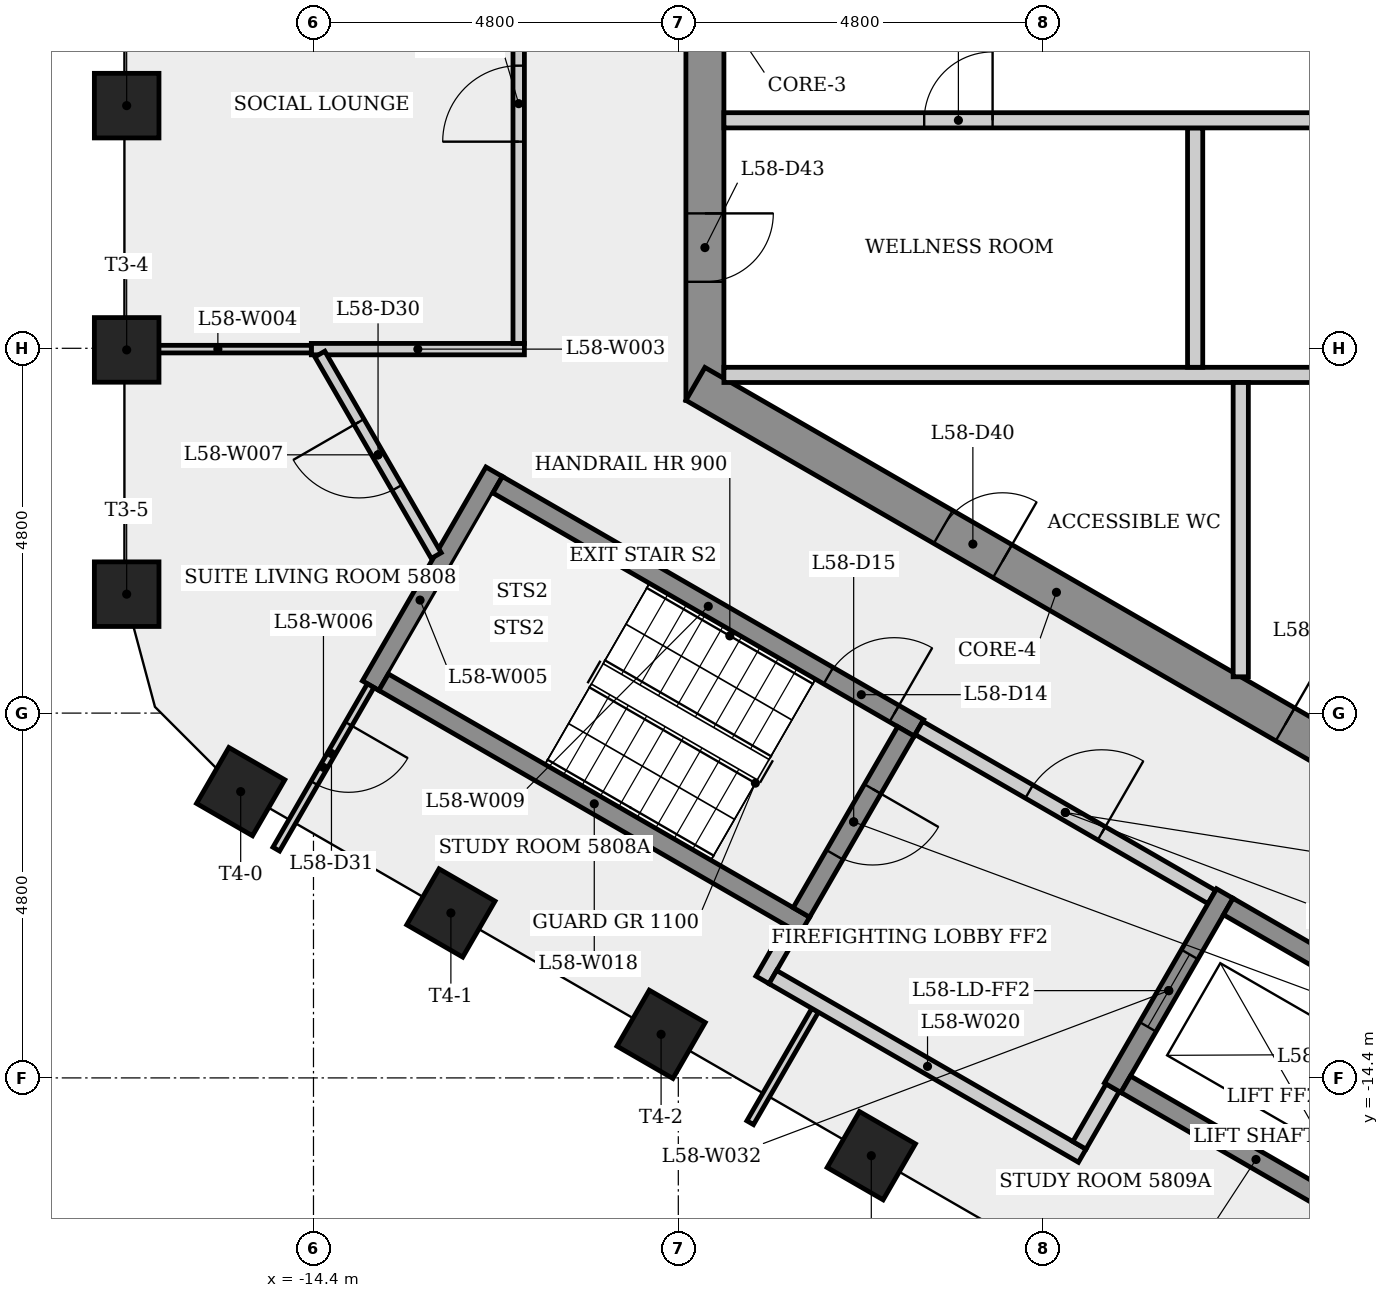
"""IFC4 building model, lengths in metres.
Left out: names, types, materials, properties, quantities, classifications, styles, units other than length and angle.
Written with IfcOpenShell. Run it as: python <this file> out.ifc"""

import sys

from ifc_helpers import new_model, si_unit, direction, frame, frame_2d, origin, origin_2d, place, context, subcontext, project, spatial, rectangle, extrude, element, fill, save


model = new_model("IFC4")
c1 = context("Model", 3, precision=1e-05, world=origin(), true_north=direction((0.0, 1.0)))
c2 = subcontext(c1, "Body", "Model", "MODEL_VIEW")
j1 = project(units=[si_unit("LENGTHUNIT", "METRE"), si_unit("PLANEANGLEUNIT", "RADIAN")], contexts=[c1])
p1 = place(None, origin())
s1 = spatial("IfcSite", under=j1, at=p1, CompositionType="ELEMENT")
p2 = place(p1, origin())
s2 = spatial("IfcBuilding", under=s1, at=p2, CompositionType="ELEMENT")
p3 = place(p2, frame((0.0, 0.0, 218.9)))
s3 = spatial("IfcBuildingStorey", under=s2, at=p3, CompositionType="ELEMENT", Elevation=218.9)
p4 = place(p3, frame((-9.25, 5.485, 0.0), z_axis=(0.0, 0.0, 1.0), x_axis=(0.0, -1.0, 0.0)))
e1 = element("IfcWall", 1, at=p4, inside=s3, PredefinedType="SHEAR", context=c2, shape_type="SweptSolid", body=[
    extrude(rectangle(XDim=10.97, YDim=0.5, at=frame_2d((5.485, 0.0))), origin(), (0.0, 0.0, 1.0), 3.4),
])
p5 = place(p4, frame((8.51, 0.0, 0.0)))
e2 = element("IfcOpeningElement", 2, at=p5, cuts=e1, PredefinedType="OPENING", context=c2, shape_type="SweptSolid", body=[
    extrude(rectangle(XDim=0.9, YDim=2.1, at=frame_2d((0.45, 1.05))), frame((0.0, 0.26, 0.0), z_axis=(0.0, -1.0, 0.0), x_axis=(1.0, 0.0, 0.0)), (0.0, 0.0, 1.0), 0.52),
])
p6 = place(p4, frame((4.685, 0.0, 0.0)))
e3 = element("IfcOpeningElement", 3, at=p6, cuts=e1, PredefinedType="OPENING", context=c2, shape_type="SweptSolid", body=[
    extrude(rectangle(XDim=1.6, YDim=2.1, at=frame_2d((0.8, 1.05))), frame((0.0, 0.26, 0.0), z_axis=(0.0, -1.0, 0.0), x_axis=(1.0, 0.0, 0.0)), (0.0, 0.0, 1.0), 0.52),
])
p7 = place(p3, frame((-9.375, -5.268, 0.0), z_axis=(0.0, 0.0, 1.0), x_axis=(0.866023993627, -0.500002442456, 0.0)))
e4 = element("IfcWall", 4, at=p7, inside=s3, PredefinedType="SHEAR", context=c2, shape_type="SweptSolid", body=[
    extrude(rectangle(XDim=10.97, YDim=0.5, at=frame_2d((5.485, 0.0))), origin(), (0.0, 0.0, 1.0), 3.4),
])
p8 = place(p7, frame((3.765, 0.0, 0.0)))
e5 = element("IfcOpeningElement", 5, at=p8, cuts=e4, PredefinedType="OPENING", context=c2, shape_type="SweptSolid", body=[
    extrude(rectangle(XDim=0.9, YDim=2.1, at=frame_2d((0.45, 1.05))), frame((0.0, 0.26, 0.0), z_axis=(0.0, -1.0, 0.0), x_axis=(1.0, 0.0, 0.0)), (0.0, 0.0, 1.0), 0.52),
])
p9 = place(p7, frame((8.96, 0.0, 0.0)))
e6 = element("IfcOpeningElement", 6, at=p9, cuts=e4, PredefinedType="OPENING", context=c2, shape_type="SweptSolid", body=[
    extrude(rectangle(XDim=0.9, YDim=2.1, at=frame_2d((0.45, 1.05))), frame((0.0, 0.26, 0.0), z_axis=(0.0, -1.0, 0.0), x_axis=(1.0, 0.0, 0.0)), (0.0, 0.0, 1.0), 0.52),
])
for number, where, z_axis, x_axis in (
    (7, (-16.858, -1.607, 0.0), (0.0, 0.0, 1.0), (-1.0, 0.0, 0.0)),
    (8, (-16.858, -4.821, 0.0), (0.0, 0.0, 1.0), (-1.0, 0.0, 0.0)),
    (9, (-16.858, -8.035, 0.0), (0.0, 0.0, 1.0), (-1.0, 0.0, 0.0)),
    (10, (-15.358, -10.633, 0.0), (0.0, 0.0, 1.0), (-0.5, -0.866, 0.0)),
    (11, (-12.592, -12.23, 0.0), (0.0, 0.0, 1.0), (-0.5, -0.866, 0.0)),
    (12, (-9.827, -13.827, 0.0), (0.0, 0.0, 1.0), (-0.5, -0.866, 0.0)),
    (13, (-7.061, -15.423, 0.0), (0.0, 0.0, 1.0), (-0.5, -0.866, 0.0)),
):
    element("IfcColumn", number, at=place(p3, frame(where, z_axis=z_axis, x_axis=x_axis)), inside=s3, PredefinedType="COLUMN", context=c2, shape_type="SweptSolid", body=[
        extrude(rectangle(XDim=0.85, YDim=0.85, at=origin_2d()), origin(), (0.0, 0.0, 1.0), 3.4),
    ])
p10 = place(p3, frame((-14.428, -4.811, 0.0), z_axis=(0.0, 0.0, 1.0), x_axis=(1.0, 0.0, 0.0)))
e14 = element("IfcWall", 14, at=p10, inside=s3, PredefinedType="PARTITIONING", context=c2, shape_type="SweptSolid", body=[
    extrude(rectangle(XDim=2.803, YDim=0.15, at=frame_2d((1.402, 0.0))), origin(), (0.0, 0.0, 1.0), 3.05),
])
p11 = place(p3, frame((-14.428, -4.811, 0.0), z_axis=(0.0, 0.0, 1.0), x_axis=(-1.0, 0.0, 0.0)))
e15 = element("IfcWall", 15, at=p11, inside=s3, PredefinedType="PARTITIONING", context=c2, shape_type="SweptSolid", body=[
    extrude(rectangle(XDim=2.459, YDim=0.1, at=frame_2d((1.229, 0.0))), origin(), (0.0, 0.0, 1.0), 3.05),
])
p12 = place(p3, frame((-13.648, -9.239, 0.0), z_axis=(0.0, 0.0, 1.0), x_axis=(0.500017246033, 0.866015446554, 0.0)))
e16 = element("IfcWall", 16, at=p12, inside=s3, PredefinedType="SHEAR", context=c2, shape_type="SweptSolid", body=[
    extrude(rectangle(XDim=3.25, YDim=0.25, at=frame_2d((1.625, 0.0))), origin(), (0.0, 0.0, 1.0), 3.05),
])
p13 = place(p3, frame((-13.648, -9.239, 0.0), z_axis=(0.0, 0.0, 1.0), x_axis=(-0.500040114371, -0.866002242503, 0.0)))
e17 = element("IfcWall", 17, at=p13, inside=s3, PredefinedType="PARTITIONING", context=c2, shape_type="SweptSolid", body=[
    extrude(rectangle(XDim=2.484, YDim=0.1, at=frame_2d((1.242, 0.0))), origin(), (0.0, 0.0, 1.0), 3.05),
])
p14 = place(p13, frame((0.581, 0.0, 0.0)))
e18 = element("IfcOpeningElement", 18, at=p14, cuts=e17, PredefinedType="OPENING", context=c2, shape_type="SweptSolid", body=[
    extrude(rectangle(XDim=0.9, YDim=2.1, at=frame_2d((0.45, 1.05))), frame((0.0, 0.06, 0.0), z_axis=(0.0, -1.0, 0.0), x_axis=(1.0, 0.0, 0.0)), (0.0, 0.0, 1.0), 0.12),
])
p15 = place(p3, frame((-12.785, -7.528, 0.0), z_axis=(0.0, 0.0, 1.0), x_axis=(-0.499989318644, 0.86603157058, 0.0)))
e19 = element("IfcWall", 19, at=p15, inside=s3, PredefinedType="PARTITIONING", context=c2, shape_type="SweptSolid", body=[
    extrude(rectangle(XDim=3.062, YDim=0.15, at=frame_2d((1.531, 0.0))), origin(), (0.0, 0.0, 1.0), 3.05),
])
p16 = place(p15, frame((1.031, 0.0, 0.0)))
e20 = element("IfcOpeningElement", 20, at=p16, cuts=e19, PredefinedType="OPENING", context=c2, shape_type="SweptSolid", body=[
    extrude(rectangle(XDim=1.0, YDim=2.1, at=frame_2d((0.5, 1.05))), frame((0.0, 0.085, 0.0), z_axis=(0.0, -1.0, 0.0), x_axis=(1.0, 0.0, 0.0)), (0.0, 0.0, 1.0), 0.17),
])
p17 = place(p3, frame((-11.977, -6.595, 0.0), z_axis=(0.0, 0.0, 1.0), x_axis=(0.866025499775, -0.499999833739, 0.0)))
e21 = element("IfcWall", 21, at=p17, inside=s3, PredefinedType="SHEAR", context=c2, shape_type="SweptSolid", body=[
    extrude(rectangle(XDim=6.4, YDim=0.25, at=frame_2d((3.2, 0.0))), origin(), (0.0, 0.0, 1.0), 3.05),
])
p18 = place(p17, frame((5.025, 0.0, 0.0)))
e22 = element("IfcOpeningElement", 22, at=p18, cuts=e21, PredefinedType="OPENING", context=c2, shape_type="SweptSolid", body=[
    extrude(rectangle(XDim=1.0, YDim=2.1, at=frame_2d((0.5, 1.05))), frame((0.0, 0.135, 0.0), z_axis=(0.0, -1.0, 0.0), x_axis=(1.0, 0.0, 0.0)), (0.0, 0.0, 1.0), 0.27),
])
p19 = place(p3, frame((-11.7, -4.736, 0.0), z_axis=(0.0, 0.0, 1.0), x_axis=(0.0, 1.0, 0.0)))
e23 = element("IfcWall", 23, at=p19, inside=s3, PredefinedType="PARTITIONING", context=c2, shape_type="SweptSolid", body=[
    extrude(rectangle(XDim=9.622, YDim=0.15, at=frame_2d((4.811, 0.0))), origin(), (0.0, 0.0, 1.0), 3.05),
])
p20 = place(p19, frame((7.443, 0.0, 0.0)))
e24 = element("IfcOpeningElement", 24, at=p20, cuts=e23, PredefinedType="OPENING", context=c2, shape_type="SweptSolid", body=[
    extrude(rectangle(XDim=1.0, YDim=2.1, at=frame_2d((0.5, 1.05))), frame((0.0, 0.085, 0.0), z_axis=(0.0, -1.0, 0.0), x_axis=(1.0, 0.0, 0.0)), (0.0, 0.0, 1.0), 0.17),
])
p21 = place(p19, frame((2.655, 0.0, 0.0)))
e25 = element("IfcOpeningElement", 25, at=p21, cuts=e23, PredefinedType="OPENING", context=c2, shape_type="SweptSolid", body=[
    extrude(rectangle(XDim=1.0, YDim=2.1, at=frame_2d((0.5, 1.05))), frame((0.0, 0.085, 0.0), z_axis=(0.0, -1.0, 0.0), x_axis=(1.0, 0.0, 0.0)), (0.0, 0.0, 1.0), 0.17),
])
p22 = place(p3, frame((-9.0, -5.15, 0.0), z_axis=(0.0, 0.0, 1.0), x_axis=(1.0, 0.0, 0.0)))
e26 = element("IfcWall", 26, at=p22, inside=s3, PredefinedType="PARTITIONING", context=c2, shape_type="SweptSolid", body=[
    extrude(rectangle(XDim=11.325, YDim=0.2, at=frame_2d((5.663, 0.0))), origin(), (0.0, 0.0, 1.0), 3.05),
])
p23 = place(p3, frame((-8.493, -13.11, 0.0), z_axis=(0.0, 0.0, 1.0), x_axis=(0.500067724834, 0.865986299303, 0.0)))
e27 = element("IfcWall", 27, at=p23, inside=s3, PredefinedType="PARTITIONING", context=c2, shape_type="SweptSolid", body=[
    extrude(rectangle(XDim=0.775, YDim=0.2, at=frame_2d((0.388, 0.0))), origin(), (0.0, 0.0, 1.0), 3.05),
])
p24 = place(p3, frame((-7.935, -12.393, 0.0), z_axis=(0.0, 0.0, 1.0), x_axis=(-0.866025499775, 0.499999833739, 0.0)))
e28 = element("IfcWall", 28, at=p24, inside=s3, PredefinedType="SHEAR", context=c2, shape_type="SweptSolid", body=[
    extrude(rectangle(XDim=6.4, YDim=0.25, at=frame_2d((3.2, 0.0))), origin(), (0.0, 0.0, 1.0), 3.05),
])
p25 = place(p3, frame((-7.8, -13.51, 0.0), z_axis=(0.0, 0.0, 1.0), x_axis=(-0.500027584368, -0.866009477356, 0.0)))
e29 = element("IfcWall", 29, at=p25, inside=s3, PredefinedType="PARTITIONING", context=c2, shape_type="SweptSolid", body=[
    extrude(rectangle(XDim=1.708, YDim=0.1, at=frame_2d((0.854, 0.0))), origin(), (0.0, 0.0, 1.0), 3.05),
])
p26 = place(p3, frame((-8.356, -13.073, 0.0), z_axis=(0.0, 0.0, 1.0), x_axis=(0.866038532462, -0.499977259774, 0.0)))
e30 = element("IfcWall", 30, at=p26, inside=s3, PredefinedType="PARTITIONING", context=c2, shape_type="SweptSolid", body=[
    extrude(rectangle(XDim=4.7, YDim=0.2, at=frame_2d((2.35, 0.0))), origin(), (0.0, 0.0, 1.0), 3.05),
])
p27 = place(p3, frame((-6.605, -9.841, 0.0), z_axis=(0.0, 0.0, 1.0), x_axis=(-0.499996545922, -0.866027397988, 0.0)))
e31 = element("IfcWall", 31, at=p27, inside=s3, PredefinedType="SHEAR", context=c2, shape_type="SweptSolid", body=[
    extrude(rectangle(XDim=2.75, YDim=0.25, at=frame_2d((1.375, 0.0))), origin(), (0.0, 0.0, 1.0), 3.05),
])
p28 = place(p27, frame((0.875, 0.0, 0.0)))
e32 = element("IfcOpeningElement", 32, at=p28, cuts=e31, PredefinedType="OPENING", context=c2, shape_type="SweptSolid", body=[
    extrude(rectangle(XDim=1.0, YDim=2.1, at=frame_2d((0.5, 1.05))), frame((0.0, 0.135, 0.0), z_axis=(0.0, -1.0, 0.0), x_axis=(1.0, 0.0, 0.0)), (0.0, 0.0, 1.0), 0.27),
])
p29 = place(p3, frame((-6.435, -9.795, 0.0), z_axis=(0.0, 0.0, 1.0), x_axis=(0.866012907634, -0.500021643343, 0.0)))
e33 = element("IfcWall", 33, at=p29, inside=s3, PredefinedType="PARTITIONING", context=c2, shape_type="SweptSolid", body=[
    extrude(rectangle(XDim=4.45, YDim=0.2, at=frame_2d((2.225, 0.0))), origin(), (0.0, 0.0, 1.0), 3.05),
])
p30 = place(p29, frame((1.675, 0.0, 0.0)))
e34 = element("IfcOpeningElement", 34, at=p30, cuts=e33, PredefinedType="OPENING", context=c2, shape_type="SweptSolid", body=[
    extrude(rectangle(XDim=1.1, YDim=2.1, at=frame_2d((0.55, 1.05))), frame((0.0, 0.11, 0.0), z_axis=(0.0, -1.0, 0.0), x_axis=(1.0, 0.0, 0.0)), (0.0, 0.0, 1.0), 0.22),
])
p31 = place(p3, frame((-3.885, -14.529, 0.0), z_axis=(0.0, 0.0, 1.0), x_axis=(-0.499859285417, -0.866106630146, 0.0)))
e35 = element("IfcWall", 35, at=p31, inside=s3, PredefinedType="PARTITIONING", context=c2, shape_type="SweptSolid", body=[
    extrude(rectangle(XDim=0.875, YDim=0.2, at=frame_2d((0.438, 0.0))), origin(), (0.0, 0.0, 1.0), 3.05),
])
p32 = place(p3, frame((-2.8, -1.9, 0.0), z_axis=(0.0, 0.0, 1.0), x_axis=(0.0, -1.0, 0.0)))
e36 = element("IfcWall", 36, at=p32, inside=s3, PredefinedType="PARTITIONING", context=c2, shape_type="SweptSolid", body=[
    extrude(rectangle(XDim=3.15, YDim=0.2, at=frame_2d((1.575, 0.0))), origin(), (0.0, 0.0, 1.0), 3.05),
])
p33 = place(p3, frame((-9.0, -1.8, 0.0), z_axis=(0.0, 0.0, 1.0), x_axis=(1.0, 0.0, 0.0)))
e37 = element("IfcWall", 37, at=p33, inside=s3, PredefinedType="PARTITIONING", context=c2, shape_type="SweptSolid", body=[
    extrude(rectangle(XDim=11.325, YDim=0.2, at=frame_2d((5.663, 0.0))), origin(), (0.0, 0.0, 1.0), 3.05),
])
p34 = place(p33, frame((2.635, 0.0, 0.0)))
e38 = element("IfcOpeningElement", 38, at=p34, cuts=e37, PredefinedType="OPENING", context=c2, shape_type="SweptSolid", body=[
    extrude(rectangle(XDim=0.9, YDim=2.1, at=frame_2d((0.45, 1.05))), frame((0.0, 0.11, 0.0), z_axis=(0.0, -1.0, 0.0), x_axis=(1.0, 0.0, 0.0)), (0.0, 0.0, 1.0), 0.22),
])
p35 = place(p33, frame((8.488, 0.0, 0.0)))
e39 = element("IfcOpeningElement", 39, at=p35, cuts=e37, PredefinedType="OPENING", context=c2, shape_type="SweptSolid", body=[
    extrude(rectangle(XDim=0.9, YDim=2.1, at=frame_2d((0.45, 1.05))), frame((0.0, 0.11, 0.0), z_axis=(0.0, -1.0, 0.0), x_axis=(1.0, 0.0, 0.0)), (0.0, 0.0, 1.0), 0.22),
])
p36 = place(p3, frame((-2.41, -11.974, 0.0), z_axis=(0.0, 0.0, 1.0), x_axis=(-0.500001826776, -0.866024349092, 0.0)))
e40 = element("IfcWall", 40, at=p36, inside=s3, PredefinedType="SHEAR", context=c2, shape_type="SweptSolid", body=[
    extrude(rectangle(XDim=2.95, YDim=0.25, at=frame_2d((1.475, 0.0))), origin(), (0.0, 0.0, 1.0), 3.05),
])
p37 = place(p36, frame((0.925, 0.0, 0.0)))
e41 = element("IfcOpeningElement", 41, at=p37, cuts=e40, PredefinedType="OPENING", context=c2, shape_type="SweptSolid", body=[
    extrude(rectangle(XDim=1.1, YDim=2.1, at=frame_2d((0.55, 1.05))), frame((0.0, 0.135, 0.0), z_axis=(0.0, -1.0, 0.0), x_axis=(1.0, 0.0, 0.0)), (0.0, 0.0, 1.0), 0.27),
])
p38 = place(p3, frame((-2.364, -12.145, 0.0), z_axis=(0.0, 0.0, 1.0), x_axis=(0.866040211805, -0.499974350878, 0.0)))
e42 = element("IfcWall", 42, at=p38, inside=s3, PredefinedType="SHEAR", context=c2, shape_type="SweptSolid", body=[
    extrude(rectangle(XDim=3.3, YDim=0.25, at=frame_2d((1.65, 0.0))), origin(), (0.0, 0.0, 1.0), 3.05),
])
p39 = place(p3, frame((-2.419, -18.59, 0.0), z_axis=(0.0, 0.0, 1.0), x_axis=(0.500016013541, 0.866016158165, 0.0)))
e43 = element("IfcWall", 43, at=p39, inside=s3, PredefinedType="PARTITIONING", context=c2, shape_type="SweptSolid", body=[
    extrude(rectangle(XDim=2.784, YDim=0.1, at=frame_2d((1.392, 0.0))), origin(), (0.0, 0.0, 1.0), 3.05),
])
p40 = place(p39, frame((1.152, 0.0, 0.0)))
e44 = element("IfcOpeningElement", 44, at=p40, cuts=e43, PredefinedType="OPENING", context=c2, shape_type="SweptSolid", body=[
    extrude(rectangle(XDim=0.9, YDim=2.1, at=frame_2d((0.45, 1.05))), frame((0.0, 0.06, 0.0), z_axis=(0.0, -1.0, 0.0), x_axis=(1.0, 0.0, 0.0)), (0.0, 0.0, 1.0), 0.12),
])
p41 = place(p3, frame((-2.2, -5.25, 0.0), z_axis=(0.0, 0.0, 1.0), x_axis=(0.0, -1.0, 0.0)))
e45 = element("IfcWall", 45, at=p41, inside=s3, PredefinedType="PARTITIONING", context=c2, shape_type="SweptSolid", body=[
    extrude(rectangle(XDim=3.872, YDim=0.2, at=frame_2d((1.936, 0.0))), origin(), (0.0, 0.0, 1.0), 3.05),
])
p42 = place(p3, frame((-0.856, -16.133, 0.0), z_axis=(0.0, 0.0, 1.0), x_axis=(-0.866021716278, 0.500006386895, 0.0)))
e46 = element("IfcWall", 46, at=p42, inside=s3, PredefinedType="SHEAR", context=c2, shape_type="SweptSolid", body=[
    extrude(rectangle(XDim=3.3, YDim=0.25, at=frame_2d((1.65, 0.0))), origin(), (0.0, 0.0, 1.0), 3.05),
])
p43 = place(p34, origin())
e47 = element("IfcDoor", 47, at=p43, inside=s3, OperationType="SINGLE_SWING_RIGHT", PredefinedType="DOOR", context=c2, shape_type="SweptSolid", body=[
    extrude(rectangle(XDim=0.9, YDim=2.1, at=frame_2d((0.45, 1.05))), frame((0.0, 0.025, 0.0), z_axis=(0.0, -1.0, 0.0), x_axis=(1.0, 0.0, 0.0)), (0.0, 0.0, 1.0), 0.05),
])
fill(e38, e47)
p44 = place(p18, origin())
e48 = element("IfcDoor", 48, at=p44, inside=s3, OperationType="SINGLE_SWING_RIGHT", PredefinedType="DOOR", context=c2, shape_type="SweptSolid", body=[
    extrude(rectangle(XDim=1.0, YDim=2.1, at=frame_2d((0.5, 1.05))), frame((0.0, 0.025, 0.0), z_axis=(0.0, -1.0, 0.0), x_axis=(1.0, 0.0, 0.0)), (0.0, 0.0, 1.0), 0.05),
])
fill(e22, e48)
p45 = place(p28, origin())
e49 = element("IfcDoor", 49, at=p45, inside=s3, OperationType="SINGLE_SWING_LEFT", PredefinedType="DOOR", context=c2, shape_type="SweptSolid", body=[
    extrude(rectangle(XDim=1.0, YDim=2.1, at=frame_2d((0.5, 1.05))), frame((0.0, 0.025, 0.0), z_axis=(0.0, -1.0, 0.0), x_axis=(1.0, 0.0, 0.0)), (0.0, 0.0, 1.0), 0.05),
])
fill(e32, e49)
p46 = place(p30, origin())
e50 = element("IfcDoor", 50, at=p46, inside=s3, OperationType="SINGLE_SWING_RIGHT", PredefinedType="DOOR", context=c2, shape_type="SweptSolid", body=[
    extrude(rectangle(XDim=1.1, YDim=2.1, at=frame_2d((0.55, 1.05))), frame((0.0, 0.025, 0.0), z_axis=(0.0, -1.0, 0.0), x_axis=(1.0, 0.0, 0.0)), (0.0, 0.0, 1.0), 0.05),
])
fill(e34, e50)
p47 = place(p37, origin())
e51 = element("IfcDoor", 51, at=p47, inside=s3, OperationType="SLIDING_TO_LEFT", PredefinedType="DOOR", context=c2, shape_type="SweptSolid", body=[
    extrude(rectangle(XDim=1.1, YDim=2.1, at=frame_2d((0.55, 1.05))), frame((0.0, 0.025, 0.0), z_axis=(0.0, -1.0, 0.0), x_axis=(1.0, 0.0, 0.0)), (0.0, 0.0, 1.0), 0.05),
])
fill(e41, e51)
p48 = place(p21, origin())
e52 = element("IfcDoor", 52, at=p48, inside=s3, OperationType="SINGLE_SWING_LEFT", PredefinedType="DOOR", context=c2, shape_type="SweptSolid", body=[
    extrude(rectangle(XDim=1.0, YDim=2.1, at=frame_2d((0.5, 1.05))), frame((0.0, 0.025, 0.0), z_axis=(0.0, -1.0, 0.0), x_axis=(1.0, 0.0, 0.0)), (0.0, 0.0, 1.0), 0.05),
])
fill(e25, e52)
p49 = place(p16, origin())
e53 = element("IfcDoor", 53, at=p49, inside=s3, OperationType="SINGLE_SWING_RIGHT", PredefinedType="DOOR", context=c2, shape_type="SweptSolid", body=[
    extrude(rectangle(XDim=1.0, YDim=2.1, at=frame_2d((0.5, 1.05))), frame((0.0, 0.025, 0.0), z_axis=(0.0, -1.0, 0.0), x_axis=(1.0, 0.0, 0.0)), (0.0, 0.0, 1.0), 0.05),
])
fill(e20, e53)
p50 = place(p14, origin())
e54 = element("IfcDoor", 54, at=p50, inside=s3, OperationType="SINGLE_SWING_LEFT", PredefinedType="DOOR", context=c2, shape_type="SweptSolid", body=[
    extrude(rectangle(XDim=0.9, YDim=2.1, at=frame_2d((0.45, 1.05))), frame((0.0, 0.025, 0.0), z_axis=(0.0, -1.0, 0.0), x_axis=(1.0, 0.0, 0.0)), (0.0, 0.0, 1.0), 0.05),
])
fill(e18, e54)
p51 = place(p8, origin())
e55 = element("IfcDoor", 55, at=p51, inside=s3, OperationType="SINGLE_SWING_RIGHT", PredefinedType="DOOR", context=c2, shape_type="SweptSolid", body=[
    extrude(rectangle(XDim=0.9, YDim=2.1, at=frame_2d((0.45, 1.05))), frame((0.0, 0.025, 0.0), z_axis=(0.0, -1.0, 0.0), x_axis=(1.0, 0.0, 0.0)), (0.0, 0.0, 1.0), 0.05),
])
fill(e5, e55)
p52 = place(p9, origin())
e56 = element("IfcDoor", 56, at=p52, inside=s3, OperationType="SINGLE_SWING_LEFT", PredefinedType="DOOR", context=c2, shape_type="SweptSolid", body=[
    extrude(rectangle(XDim=0.9, YDim=2.1, at=frame_2d((0.45, 1.05))), frame((0.0, 0.025, 0.0), z_axis=(0.0, -1.0, 0.0), x_axis=(1.0, 0.0, 0.0)), (0.0, 0.0, 1.0), 0.05),
])
fill(e6, e56)
p53 = place(p5, origin())
e57 = element("IfcDoor", 57, at=p53, inside=s3, OperationType="SINGLE_SWING_LEFT", PredefinedType="DOOR", context=c2, shape_type="SweptSolid", body=[
    extrude(rectangle(XDim=0.9, YDim=2.1, at=frame_2d((0.45, 1.05))), frame((0.0, 0.025, 0.0), z_axis=(0.0, -1.0, 0.0), x_axis=(1.0, 0.0, 0.0)), (0.0, 0.0, 1.0), 0.05),
])
fill(e2, e57)
save(model, sys.argv[1])
